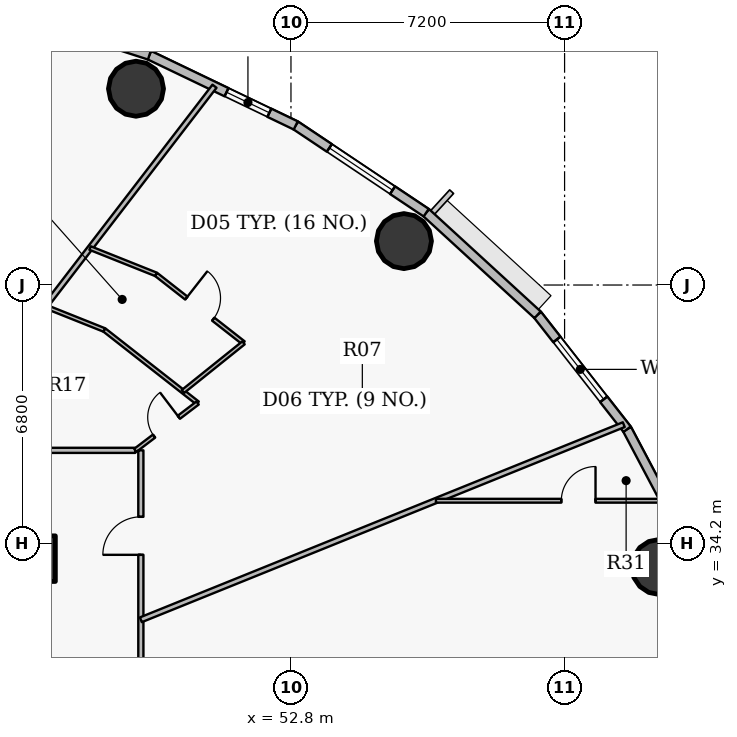
"""IFC4 building model, lengths in metres.
Left out: names, types, materials, properties, quantities, classifications, styles, units other than length and angle.
Written with IfcOpenShell. Run it as: python <this file> out.ifc"""

import sys

from ifc_helpers import new_model, si_unit, direction, frame, frame_2d, origin, origin_2d, place, context, subcontext, project, spatial, rectangle, hollow_circle, extrude, source, transform, mapped, element, fill, save


model = new_model("IFC4")
c1 = context("Model", 3, precision=1e-05, world=origin(), true_north=direction((0.0, 1.0)))
c2 = subcontext(c1, "Body", "Model", "MODEL_VIEW")
j1 = project(units=[si_unit("LENGTHUNIT", "METRE"), si_unit("PLANEANGLEUNIT", "RADIAN")], contexts=[c1])
p1 = place(None, origin())
s1 = spatial("IfcSite", under=j1, at=p1, CompositionType="ELEMENT")
p2 = place(p1, origin())
s2 = spatial("IfcBuilding", under=s1, at=p2, CompositionType="ELEMENT")
p3 = place(p2, frame((0.0, 0.0, 104.7)))
s3 = spatial("IfcBuildingStorey", under=s2, at=p3, CompositionType="ELEMENT", Elevation=104.7)
p4 = place(p3, frame((46.0, 33.8, 0.0), z_axis=(0.0, 0.0, 1.0), x_axis=(1.0, 0.0, 0.0)))
e1 = element("IfcColumn", 1, at=p4, inside=s3, PredefinedType="COLUMN", context=c2, shape_type="SweptSolid", body=[
    extrude(rectangle(XDim=1.2, YDim=1.2, at=origin_2d()), origin(), (0.0, 0.0, 1.0), 3.75),
])
for number, where, z_axis, x_axis in (
    (2, (62.493, 33.581, 0.0), (0.0, 0.0, 1.0), (1.0, 0.0, 0.0)),
    (3, (55.773, 42.156, 0.0), (0.0, 0.0, 1.0), (1.0, 0.0, 0.0)),
    (4, (48.722, 46.165, 0.0), (0.0, 0.0, 1.0), (1.0, 0.0, 0.0)),
):
    element("IfcColumn", number, at=place(p3, frame(where, z_axis=z_axis, x_axis=x_axis)), inside=s3, PredefinedType="COLUMN", context=c2, shape_type="SweptSolid", body=[
        extrude(hollow_circle(Radius=0.725, WallThickness=0.042, at=origin_2d()), origin(), (0.0, 0.0, 1.0), 3.75),
    ])
p5 = place(p3, frame((61.645, 37.206, 0.0), z_axis=(0.0, 0.0, 1.0), x_axis=(0.467614004126, -0.883932770716, 0.0)))
e5 = element("IfcWall", 5, at=p5, inside=s3, PredefinedType="SOLIDWALL", context=c2, shape_type="SweptSolid", body=[
    extrude(rectangle(XDim=3.689, YDim=0.24, at=frame_2d((1.844, 0.0))), origin(), (0.0, 0.0, 1.0), 3.5),
])
p6 = place(p3, frame((59.289, 40.217, 0.0), z_axis=(0.0, 0.0, 1.0), x_axis=(0.616272103517, -0.787533297345, 0.0)))
e6 = element("IfcWall", 6, at=p6, inside=s3, PredefinedType="SOLIDWALL", context=c2, shape_type="SweptSolid", body=[
    extrude(rectangle(XDim=3.823, YDim=0.24, at=frame_2d((1.912, 0.0))), origin(), (0.0, 0.0, 1.0), 3.5),
])
p7 = place(p6, frame((0.824, 0.0, 0.9)))
e7 = element("IfcOpeningElement", 7, at=p7, cuts=e6, PredefinedType="OPENING", context=c2, shape_type="SweptSolid", body=[
    extrude(rectangle(XDim=2.0, YDim=1.75, at=origin_2d()), frame((1.0, 0.13, 0.875), z_axis=(0.0, -1.0, 0.0), x_axis=(1.0, 0.0, 0.0)), (0.0, 0.0, 1.0), 0.26),
])
p8 = place(p3, frame((56.358, 42.903, 0.0), z_axis=(0.0, 0.0, 1.0), x_axis=(0.737113356241, -0.675769117414, 0.0)))
e8 = element("IfcWall", 8, at=p8, inside=s3, PredefinedType="SOLIDWALL", context=c2, shape_type="SweptSolid", body=[
    extrude(rectangle(XDim=3.976, YDim=0.24, at=frame_2d((1.988, 0.0))), origin(), (0.0, 0.0, 1.0), 3.5),
])
p9 = place(p3, frame((52.925, 45.199, 0.0), z_axis=(0.0, 0.0, 1.0), x_axis=(0.831221811447, -0.555940914284, 0.0)))
e9 = element("IfcWall", 9, at=p9, inside=s3, PredefinedType="SOLIDWALL", context=c2, shape_type="SweptSolid", body=[
    extrude(rectangle(XDim=4.13, YDim=0.24, at=frame_2d((2.065, 0.0))), origin(), (0.0, 0.0, 1.0), 3.5),
])
p10 = place(p9, frame((1.065, 0.0, 0.9)))
e10 = element("IfcOpeningElement", 10, at=p10, cuts=e9, PredefinedType="OPENING", context=c2, shape_type="SweptSolid", body=[
    extrude(rectangle(XDim=2.0, YDim=1.75, at=origin_2d()), frame((1.0, 0.13, 0.875), z_axis=(0.0, -1.0, 0.0), x_axis=(1.0, 0.0, 0.0)), (0.0, 0.0, 1.0), 0.26),
])
p11 = place(p3, frame((49.074, 47.047, 0.0), z_axis=(0.0, 0.0, 1.0), x_axis=(0.901589935876, -0.432591709962, 0.0)))
e11 = element("IfcWall", 11, at=p11, inside=s3, PredefinedType="SOLIDWALL", context=c2, shape_type="SweptSolid", body=[
    extrude(rectangle(XDim=4.272, YDim=0.24, at=frame_2d((2.136, 0.0))), origin(), (0.0, 0.0, 1.0), 3.5),
])
p12 = place(p11, frame((2.252, 0.0, 0.9)))
e12 = element("IfcOpeningElement", 12, at=p12, cuts=e11, PredefinedType="OPENING", context=c2, shape_type="SweptSolid", body=[
    extrude(rectangle(XDim=1.25, YDim=1.65, at=origin_2d()), frame((0.625, 0.13, 0.825), z_axis=(0.0, -1.0, 0.0), x_axis=(1.0, 0.0, 0.0)), (0.0, 0.0, 1.0), 0.26),
])
p13 = place(p3, frame((44.9, 48.401, 0.0), z_axis=(0.0, 0.0, 1.0), x_axis=(0.951211346073, -0.308540070495, 0.0)))
e13 = element("IfcWall", 13, at=p13, inside=s3, PredefinedType="SOLIDWALL", context=c2, shape_type="SweptSolid", body=[
    extrude(rectangle(XDim=4.388, YDim=0.24, at=frame_2d((2.194, 0.0))), origin(), (0.0, 0.0, 1.0), 3.5),
])
p14 = place(p13, frame((1.194, 0.0, 0.9)))
e14 = element("IfcOpeningElement", 14, at=p14, cuts=e13, PredefinedType="OPENING", context=c2, shape_type="SweptSolid", body=[
    extrude(rectangle(XDim=2.0, YDim=1.75, at=origin_2d()), frame((1.0, 0.13, 0.875), z_axis=(0.0, -1.0, 0.0), x_axis=(1.0, 0.0, 0.0)), (0.0, 0.0, 1.0), 0.26),
])
p15 = place(p3, frame((37.205, 36.65, 0.0), z_axis=(0.0, 0.0, 1.0), x_axis=(1.0, 0.0, 0.0)))
e15 = element("IfcWall", 15, at=p15, inside=s3, PredefinedType="PARTITIONING", context=c2, shape_type="SweptSolid", body=[
    extrude(rectangle(XDim=11.499, YDim=0.135, at=frame_2d((5.75, 0.0))), origin(), (0.0, 0.0, 1.0), 2.935),
])
p16 = place(p15, frame((3.988, 0.0, 0.0)))
e16 = element("IfcOpeningElement", 16, at=p16, cuts=e15, PredefinedType="OPENING", context=c2, shape_type="SweptSolid", body=[
    extrude(rectangle(XDim=1.0, YDim=2.15, at=origin_2d()), frame((0.5, 0.078, 1.075), z_axis=(0.0, -1.0, 0.0), x_axis=(1.0, 0.0, 0.0)), (0.0, 0.0, 1.0), 0.155),
])
p17 = place(p3, frame((43.42, 36.65, 0.0), z_axis=(0.0, 0.0, 1.0), x_axis=(0.609572126114, 0.792730611913, 0.0)))
e17 = element("IfcWall", 17, at=p17, inside=s3, PredefinedType="PARTITIONING", context=c2, shape_type="SweptSolid", body=[
    extrude(rectangle(XDim=12.086, YDim=0.135, at=frame_2d((6.043, 0.0))), origin(), (0.0, 0.0, 1.0), 2.935),
])
p18 = place(p3, frame((46.333, 40.437, 0.0), z_axis=(0.0, 0.0, 1.0), x_axis=(0.928817558248, -0.370537371247, 0.0)))
e18 = element("IfcWall", 18, at=p18, inside=s3, PredefinedType="PARTITIONING", context=c2, shape_type="SweptSolid", body=[
    extrude(rectangle(XDim=1.677, YDim=0.1, at=frame_2d((0.839, 0.0))), origin(), (0.0, 0.0, 1.0), 3.085),
])
p19 = place(p3, frame((47.514, 41.973, 0.0), z_axis=(0.0, 0.0, 1.0), x_axis=(0.928809612726, -0.370557287485, 0.0)))
e19 = element("IfcWall", 19, at=p19, inside=s3, PredefinedType="PARTITIONING", context=c2, shape_type="SweptSolid", body=[
    extrude(rectangle(XDim=1.869, YDim=0.1, at=frame_2d((0.935, 0.0))), origin(), (0.0, 0.0, 1.0), 3.5),
])
p20 = place(p3, frame((47.891, 39.816, 0.0), z_axis=(0.0, 0.0, 1.0), x_axis=(0.787339621997, -0.616519520887, 0.0)))
e20 = element("IfcWall", 20, at=p20, inside=s3, PredefinedType="PARTITIONING", context=c2, shape_type="SweptSolid", body=[
    extrude(rectangle(XDim=3.116, YDim=0.1, at=frame_2d((1.558, 0.0))), origin(), (0.0, 0.0, 1.0), 2.935),
])
p21 = place(p3, frame((48.704, 36.65, 0.0), z_axis=(0.0, 0.0, 1.0), x_axis=(0.796299280247, 0.604902848628, 0.0)))
e21 = element("IfcWall", 21, at=p21, inside=s3, PredefinedType="PARTITIONING", context=c2, shape_type="SweptSolid", body=[
    extrude(rectangle(XDim=2.059, YDim=0.1, at=frame_2d((1.029, 0.0))), origin(), (0.0, 0.0, 1.0), 2.935),
])
p22 = place(p21, frame((0.619, 0.0, 0.0)))
e22 = element("IfcOpeningElement", 22, at=p22, cuts=e21, PredefinedType="OPENING", context=c2, shape_type="SweptSolid", body=[
    extrude(rectangle(XDim=0.82, YDim=2.1, at=origin_2d()), frame((0.41, 0.06, 1.05), z_axis=(0.0, -1.0, 0.0), x_axis=(1.0, 0.0, 0.0)), (0.0, 0.0, 1.0), 0.12),
])
p23 = place(p3, frame((48.85, 17.35, 0.0), z_axis=(0.0, 0.0, 1.0), x_axis=(0.0, 1.0, 0.0)))
e23 = element("IfcWall", 23, at=p23, inside=s3, PredefinedType="PARTITIONING", context=c2, shape_type="SweptSolid", body=[
    extrude(rectangle(XDim=19.3, YDim=0.135, at=frame_2d((9.65, 0.0))), origin(), (0.0, 0.0, 1.0), 2.935),
])
p24 = place(p23, frame((16.551, 0.0, 0.0)))
e24 = element("IfcOpeningElement", 24, at=p24, cuts=e23, PredefinedType="OPENING", context=c2, shape_type="SweptSolid", body=[
    extrude(rectangle(XDim=1.0, YDim=2.15, at=origin_2d()), frame((0.5, 0.078, 1.075), z_axis=(0.0, -1.0, 0.0), x_axis=(1.0, 0.0, 0.0)), (0.0, 0.0, 1.0), 0.155),
])
p25 = place(p23, frame((8.753, 0.0, 0.0)))
e25 = element("IfcOpeningElement", 25, at=p25, cuts=e23, PredefinedType="OPENING", context=c2, shape_type="SweptSolid", body=[
    extrude(rectangle(XDim=1.0, YDim=2.15, at=origin_2d()), frame((0.5, 0.078, 1.075), z_axis=(0.0, -1.0, 0.0), x_axis=(1.0, 0.0, 0.0)), (0.0, 0.0, 1.0), 0.155),
])
p26 = place(p3, frame((48.85, 32.192, 0.0), z_axis=(0.0, 0.0, 1.0), x_axis=(0.927181163505, 0.374613253958, 0.0)))
e26 = element("IfcWall", 26, at=p26, inside=s3, PredefinedType="PARTITIONING", context=c2, shape_type="SweptSolid", body=[
    extrude(rectangle(XDim=13.706, YDim=0.135, at=frame_2d((6.853, 0.0))), origin(), (0.0, 0.0, 1.0), 2.935),
])
p27 = place(p3, frame((49.25, 41.28, 0.0), z_axis=(0.0, 0.0, 1.0), x_axis=(0.787360471536, -0.616492893602, 0.0)))
e27 = element("IfcWall", 27, at=p27, inside=s3, PredefinedType="PARTITIONING", context=c2, shape_type="SweptSolid", body=[
    extrude(rectangle(XDim=2.923, YDim=0.1, at=frame_2d((1.462, 0.0))), origin(), (0.0, 0.0, 1.0), 3.5),
])
p28 = place(p27, frame((1.012, 0.0, 0.0)))
e28 = element("IfcOpeningElement", 28, at=p28, cuts=e27, PredefinedType="OPENING", context=c2, shape_type="SweptSolid", body=[
    extrude(rectangle(XDim=0.9, YDim=2.1, at=origin_2d()), frame((0.45, 0.06, 1.05), z_axis=(0.0, -1.0, 0.0), x_axis=(1.0, 0.0, 0.0)), (0.0, 0.0, 1.0), 0.12),
])
p29 = place(p3, frame((49.956, 38.198, 0.0), z_axis=(0.0, 0.0, 1.0), x_axis=(0.78000622602, 0.625771753413, 0.0)))
e29 = element("IfcWall", 29, at=p29, inside=s3, PredefinedType="PARTITIONING", context=c2, shape_type="SweptSolid", body=[
    extrude(rectangle(XDim=2.045, YDim=0.1, at=frame_2d((1.022, 0.0))), origin(), (0.0, 0.0, 1.0), 3.085),
])
p30 = place(p3, frame((56.615, 35.324, 0.0), z_axis=(0.0, 0.0, 1.0), x_axis=(1.0, 0.0, 0.0)))
e30 = element("IfcWall", 30, at=p30, inside=s3, PredefinedType="PARTITIONING", context=c2, shape_type="SweptSolid", body=[
    extrude(rectangle(XDim=6.031, YDim=0.1, at=frame_2d((3.016, 0.0))), origin(), (0.0, 0.0, 1.0), 2.935),
])
p31 = place(p30, frame((3.3, 0.0, 0.0)))
e31 = element("IfcOpeningElement", 31, at=p31, cuts=e30, PredefinedType="OPENING", context=c2, shape_type="SweptSolid", body=[
    extrude(rectangle(XDim=0.9, YDim=2.1, at=origin_2d()), frame((0.45, 0.06, 1.05), z_axis=(0.0, -1.0, 0.0), x_axis=(1.0, 0.0, 0.0)), (0.0, 0.0, 1.0), 0.12),
])
m1 = source(origin(), c2, "Body", "SweptSolid", [
    extrude(rectangle(XDim=2.0, YDim=1.75, at=origin_2d()), frame((1.0, 0.03, 0.875), z_axis=(0.0, -1.0, 0.0), x_axis=(1.0, 0.0, 0.0)), (0.0, 0.0, 1.0), 0.06),
])
p32 = place(p7, origin())
e32 = element("IfcWindow", 32, at=p32, inside=s3, PartitioningType="DOUBLE_PANEL_VERTICAL", PredefinedType="WINDOW", context=c2, shape_type="MappedRepresentation", body=[
    mapped(m1, transform((0.0, 0.0, 0.0), x_axis=(1.0, 0.0, 0.0), y_axis=(0.0, 1.0, 0.0), z_axis=(0.0, 0.0, 1.0), scale=1.0)),
])
fill(e7, e32)
p33 = place(p10, origin())
e33 = element("IfcWindow", 33, at=p33, inside=s3, PartitioningType="DOUBLE_PANEL_VERTICAL", PredefinedType="WINDOW", context=c2, shape_type="MappedRepresentation", body=[
    mapped(m1, transform((0.0, 0.0, 0.0), x_axis=(1.0, 0.0, 0.0), y_axis=(0.0, 1.0, 0.0), z_axis=(0.0, 0.0, 1.0), scale=1.0)),
])
fill(e10, e33)
m2 = source(origin(), c2, "Body", "SweptSolid", [
    extrude(rectangle(XDim=1.25, YDim=1.65, at=origin_2d()), frame((0.625, 0.03, 0.825), z_axis=(0.0, -1.0, 0.0), x_axis=(1.0, 0.0, 0.0)), (0.0, 0.0, 1.0), 0.06),
])
p34 = place(p12, origin())
e34 = element("IfcWindow", 34, at=p34, inside=s3, PartitioningType="SINGLE_PANEL", PredefinedType="WINDOW", context=c2, shape_type="MappedRepresentation", body=[
    mapped(m2, transform((0.0, 0.0, 0.0), x_axis=(1.0, 0.0, 0.0), y_axis=(0.0, 1.0, 0.0), z_axis=(0.0, 0.0, 1.0), scale=1.0)),
])
fill(e12, e34)
m3 = source(origin(), c2, "Body", "SweptSolid", [
    extrude(rectangle(XDim=1.0, YDim=2.15, at=origin_2d()), frame((0.5, 0.025, 1.075), z_axis=(0.0, -1.0, 0.0), x_axis=(1.0, 0.0, 0.0)), (0.0, 0.0, 1.0), 0.05),
])
p35 = place(p24, origin())
e35 = element("IfcDoor", 35, at=p35, inside=s3, OperationType="SINGLE_SWING_LEFT", PredefinedType="DOOR", context=c2, shape_type="MappedRepresentation", body=[
    mapped(m3, transform((0.0, 0.0, 0.0), x_axis=(1.0, 0.0, 0.0), y_axis=(0.0, 1.0, 0.0), z_axis=(0.0, 0.0, 1.0), scale=1.0)),
])
fill(e24, e35)
m4 = source(origin(), c2, "Body", "SweptSolid", [
    extrude(rectangle(XDim=0.82, YDim=2.1, at=origin_2d()), frame((0.41, 0.025, 1.05), z_axis=(0.0, -1.0, 0.0), x_axis=(1.0, 0.0, 0.0)), (0.0, 0.0, 1.0), 0.05),
])
p36 = place(p22, origin())
e36 = element("IfcDoor", 36, at=p36, inside=s3, OperationType="SINGLE_SWING_RIGHT", PredefinedType="DOOR", context=c2, shape_type="MappedRepresentation", body=[
    mapped(m4, transform((0.0, 0.0, 0.0), x_axis=(1.0, 0.0, 0.0), y_axis=(0.0, 1.0, 0.0), z_axis=(0.0, 0.0, 1.0), scale=1.0)),
])
fill(e22, e36)
m5 = source(origin(), c2, "Body", "SweptSolid", [
    extrude(rectangle(XDim=0.9, YDim=2.1, at=origin_2d()), frame((0.45, 0.025, 1.05), z_axis=(0.0, -1.0, 0.0), x_axis=(1.0, 0.0, 0.0)), (0.0, 0.0, 1.0), 0.05),
])
p37 = place(p28, origin())
e37 = element("IfcDoor", 37, at=p37, inside=s3, OperationType="SINGLE_SWING_LEFT", PredefinedType="DOOR", context=c2, shape_type="MappedRepresentation", body=[
    mapped(m5, transform((0.0, 0.0, 0.0), x_axis=(1.0, 0.0, 0.0), y_axis=(0.0, 1.0, 0.0), z_axis=(0.0, 0.0, 1.0), scale=1.0)),
])
fill(e28, e37)
p38 = place(p31, origin())
e38 = element("IfcDoor", 38, at=p38, inside=s3, OperationType="SINGLE_SWING_RIGHT", PredefinedType="DOOR", context=c2, shape_type="MappedRepresentation", body=[
    mapped(m5, transform((0.0, 0.0, 0.0), x_axis=(1.0, 0.0, 0.0), y_axis=(0.0, 1.0, 0.0), z_axis=(0.0, 0.0, 1.0), scale=1.0)),
])
fill(e31, e38)
save(model, sys.argv[1])
